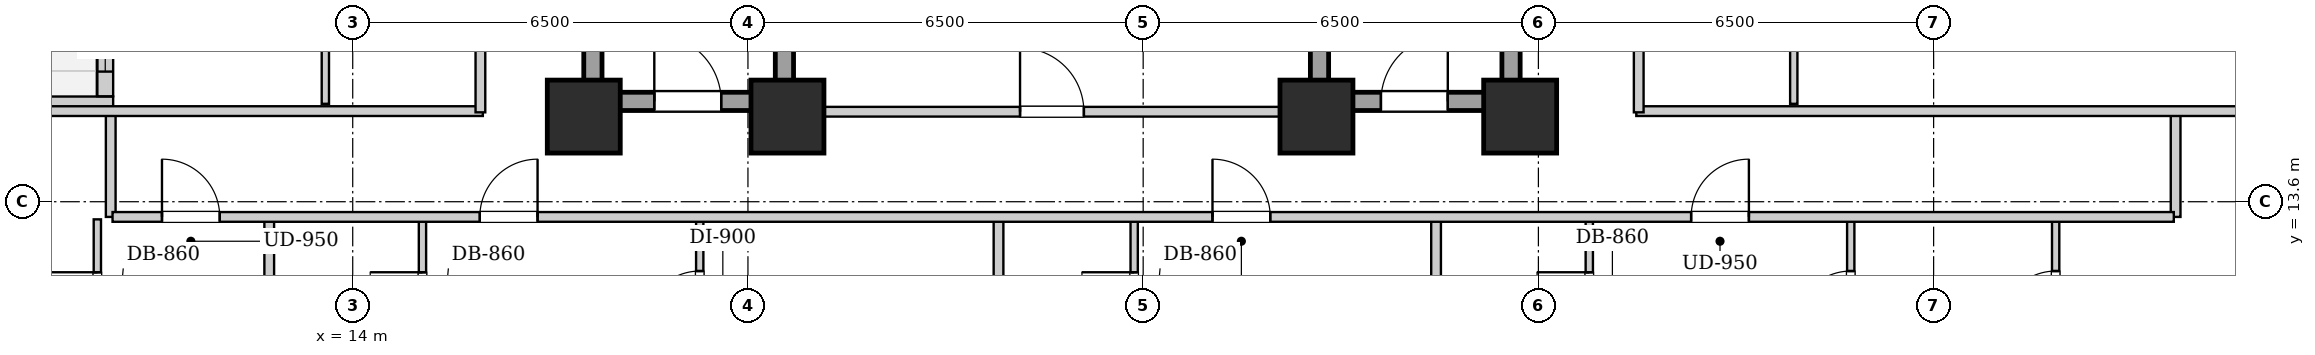
"""IFC4 building model, lengths in metres.
Left out: names, types, materials, properties, quantities, classifications, styles, units other than length and angle.
Written with IfcOpenShell. Run it as: python <this file> out.ifc"""

import sys

from ifc_helpers import new_model, si_unit, direction, frame, frame_2d, origin, origin_2d, place, context, subcontext, project, spatial, rectangle, extrude, element, fill, save


model = new_model("IFC4")
c1 = context("Model", 3, precision=1e-05, world=origin(), true_north=direction((0.0, 1.0)))
c2 = subcontext(c1, "Body", "Model", "MODEL_VIEW")
j1 = project(units=[si_unit("LENGTHUNIT", "METRE"), si_unit("PLANEANGLEUNIT", "RADIAN")], contexts=[c1])
p1 = place(None, origin())
s1 = spatial("IfcSite", under=j1, at=p1, CompositionType="ELEMENT")
p2 = place(p1, origin())
s2 = spatial("IfcBuilding", under=s1, at=p2, CompositionType="ELEMENT")
p3 = place(p2, frame((0.0, 0.0, 57.8)))
s3 = spatial("IfcBuildingStorey", under=s2, at=p3, CompositionType="ELEMENT", Elevation=57.8)
for number, where, z_axis, x_axis in (
    (1, (17.8, 15.0, 0.0), (0.0, 0.0, 1.0), (1.0, 0.0, 0.0)),
    (2, (21.15, 15.0, 0.0), (0.0, 0.0, 1.0), (1.0, 0.0, 0.0)),
    (3, (29.85, 15.0, 0.0), (0.0, 0.0, 1.0), (1.0, 0.0, 0.0)),
    (4, (33.2, 15.0, 0.0), (0.0, 0.0, 1.0), (1.0, 0.0, 0.0)),
):
    element("IfcColumn", number, at=place(p3, frame(where, z_axis=z_axis, x_axis=x_axis)), inside=s3, PredefinedType="COLUMN", context=c2, shape_type="SweptSolid", body=[
        extrude(rectangle(XDim=1.2, YDim=1.2, at=origin_2d()), origin(), (0.0, 0.0, 1.0), 3.2),
    ])
p4 = place(p3, frame((7.66, 15.2, 0.0), z_axis=(0.0, 0.0, 1.0), x_axis=(1.0, 0.0, 0.0)))
e5 = element("IfcWall", 5, at=p4, inside=s3, PredefinedType="SOLIDWALL", context=c2, shape_type="SweptSolid", body=[
    extrude(rectangle(XDim=2.4, YDim=0.26, at=frame_2d((1.2, 0.0))), origin(), (0.0, 0.0, 1.0), 2.94),
])
p5 = place(p3, frame((9.93, 15.334, 0.0), z_axis=(0.0, 0.0, 1.0), x_axis=(0.0, 1.0, 0.0)))
e6 = element("IfcWall", 6, at=p5, inside=s3, PredefinedType="SOLIDWALL", context=c2, shape_type="SweptSolid", body=[
    extrude(rectangle(XDim=3.932, YDim=0.26, at=frame_2d((1.966, 0.0))), origin(), (0.0, 0.0, 1.0), 2.94),
])
p6 = place(p5, frame((1.416, 0.0, 0.0)))
e7 = element("IfcOpeningElement", 7, at=p6, cuts=e6, PredefinedType="OPENING", context=c2, shape_type="SweptSolid", body=[
    extrude(rectangle(XDim=1.1, YDim=2.0, at=frame_2d((0.55, 1.0))), frame((0.0, 0.14, 0.0), z_axis=(0.0, -1.0, 0.0), x_axis=(1.0, 0.0, 0.0)), (0.0, 0.0, 1.0), 0.28),
])
p7 = place(p5, frame((0.406, 0.0, 0.55)))
e8 = element("IfcOpeningElement", 8, at=p7, cuts=e6, PredefinedType="OPENING", context=c2, shape_type="SweptSolid", body=[
    extrude(rectangle(XDim=0.85, YDim=1.2, at=frame_2d((0.425, 0.6))), frame((0.0, 0.14, 0.0), z_axis=(0.0, -1.0, 0.0), x_axis=(1.0, 0.0, 0.0)), (0.0, 0.0, 1.0), 0.28),
])
for number, where, z_axis, x_axis in (
    (9, (17.95, 15.1, 0.0), (0.0, 0.0, 1.0), (0.0, 1.0, 0.0)),
    (10, (21.1, 15.1, 0.0), (0.0, 0.0, 1.0), (0.0, 1.0, 0.0)),
):
    element("IfcWall", number, at=place(p3, frame(where, z_axis=z_axis, x_axis=x_axis)), inside=s3, PredefinedType="SHEAR", context=c2, shape_type="SweptSolid", body=[
        extrude(rectangle(XDim=9.0, YDim=0.3, at=frame_2d((4.5, 0.0))), origin(), (0.0, 0.0, 1.0), 2.94),
    ])
p8 = place(p3, frame((18.1, 15.25, 0.0), z_axis=(0.0, 0.0, 1.0), x_axis=(1.0, 0.0, 0.0)))
e11 = element("IfcWall", 11, at=p8, inside=s3, PredefinedType="SHEAR", context=c2, shape_type="SweptSolid", body=[
    extrude(rectangle(XDim=2.85, YDim=0.3, at=frame_2d((1.425, 0.0))), origin(), (0.0, 0.0, 1.0), 2.94),
])
p9 = place(p8, frame((0.86, 0.0, 0.0)))
e12 = element("IfcOpeningElement", 12, at=p9, cuts=e11, PredefinedType="OPENING", context=c2, shape_type="SweptSolid", body=[
    extrude(rectangle(XDim=1.1, YDim=2.05, at=frame_2d((0.55, 1.025))), frame((0.0, 0.16, 0.0), z_axis=(0.0, -1.0, 0.0), x_axis=(1.0, 0.0, 0.0)), (0.0, 0.0, 1.0), 0.32),
])
for number, where, z_axis, x_axis in (
    (13, (29.9, 15.1, 0.0), (0.0, 0.0, 1.0), (0.0, 1.0, 0.0)),
    (14, (33.05, 15.1, 0.0), (0.0, 0.0, 1.0), (0.0, 1.0, 0.0)),
):
    element("IfcWall", number, at=place(p3, frame(where, z_axis=z_axis, x_axis=x_axis)), inside=s3, PredefinedType="SHEAR", context=c2, shape_type="SweptSolid", body=[
        extrude(rectangle(XDim=9.0, YDim=0.3, at=frame_2d((4.5, 0.0))), origin(), (0.0, 0.0, 1.0), 2.94),
    ])
p10 = place(p3, frame((30.05, 15.25, 0.0), z_axis=(0.0, 0.0, 1.0), x_axis=(1.0, 0.0, 0.0)))
e15 = element("IfcWall", 15, at=p10, inside=s3, PredefinedType="SHEAR", context=c2, shape_type="SweptSolid", body=[
    extrude(rectangle(XDim=2.85, YDim=0.3, at=frame_2d((1.425, 0.0))), origin(), (0.0, 0.0, 1.0), 2.94),
])
p11 = place(p10, frame((0.86, 0.0, 0.0)))
e16 = element("IfcOpeningElement", 16, at=p11, cuts=e15, PredefinedType="OPENING", context=c2, shape_type="SweptSolid", body=[
    extrude(rectangle(XDim=1.1, YDim=2.05, at=frame_2d((0.55, 1.025))), frame((0.0, 0.16, 0.0), z_axis=(0.0, -1.0, 0.0), x_axis=(1.0, 0.0, 0.0)), (0.0, 0.0, 1.0), 0.32),
])
p12 = place(p3, frame((21.25, 15.08, 0.0), z_axis=(0.0, 0.0, 1.0), x_axis=(1.0, 0.0, 0.0)))
e17 = element("IfcWall", 17, at=p12, inside=s3, PredefinedType="PARTITIONING", context=c2, shape_type="SweptSolid", body=[
    extrude(rectangle(XDim=8.5, YDim=0.16, at=frame_2d((4.25, 0.0))), origin(), (0.0, 0.0, 1.0), 2.232),
])
p13 = place(p12, frame((3.725, 0.0, 0.0)))
e18 = element("IfcOpeningElement", 18, at=p13, cuts=e17, PredefinedType="OPENING", context=c2, shape_type="SweptSolid", body=[
    extrude(rectangle(XDim=1.05, YDim=2.05, at=frame_2d((0.525, 1.025))), frame((0.0, 0.09, 0.0), z_axis=(0.0, -1.0, 0.0), x_axis=(1.0, 0.0, 0.0)), (0.0, 0.0, 1.0), 0.18),
])
for number, where, z_axis, x_axis in (
    (19, (10.02, 13.35, 0.0), (0.0, 0.0, 1.0), (0.0, 1.0, 0.0)),
    (20, (43.98, 13.35, 0.0), (0.0, 0.0, 1.0), (0.0, 1.0, 0.0)),
):
    element("IfcWall", number, at=place(p3, frame(where, z_axis=z_axis, x_axis=x_axis)), inside=s3, PredefinedType="PARTITIONING", context=c2, shape_type="SweptSolid", body=[
        extrude(rectangle(XDim=1.74, YDim=0.16, at=frame_2d((0.87, 0.0))), origin(), (0.0, 0.0, 1.0), 2.94),
    ])
p14 = place(p3, frame((7.78, 15.09, 0.0), z_axis=(0.0, 0.0, 1.0), x_axis=(1.0, 0.0, 0.0)))
e21 = element("IfcWall", 21, at=p14, inside=s3, PredefinedType="PARTITIONING", context=c2, shape_type="SweptSolid", body=[
    extrude(rectangle(XDim=8.36, YDim=0.16, at=frame_2d((4.18, 0.0))), origin(), (0.0, 0.0, 1.0), 2.232),
])
p15 = place(p3, frame((35.11, 15.09, 0.0), z_axis=(0.0, 0.0, 1.0), x_axis=(1.0, 0.0, 0.0)))
e22 = element("IfcWall", 22, at=p15, inside=s3, PredefinedType="PARTITIONING", context=c2, shape_type="SweptSolid", body=[
    extrude(rectangle(XDim=11.11, YDim=0.16, at=frame_2d((5.555, 0.0))), origin(), (0.0, 0.0, 1.0), 2.232),
])
p16 = place(p3, frame((9.8, 10.71, 0.0), z_axis=(0.0, 0.0, 1.0), x_axis=(0.0, 1.0, 0.0)))
e23 = element("IfcWall", 23, at=p16, inside=s3, PredefinedType="PARTITIONING", context=c2, shape_type="SweptSolid", body=[
    extrude(rectangle(XDim=2.6, YDim=0.12, at=frame_2d((1.3, 0.0))), origin(), (0.0, 0.0, 1.0), 2.94),
])
p17 = place(p16, frame((0.87, 0.0, 0.0)))
e24 = element("IfcOpeningElement", 24, at=p17, cuts=e23, PredefinedType="OPENING", context=c2, shape_type="SweptSolid", body=[
    extrude(rectangle(XDim=0.86, YDim=2.05, at=frame_2d((0.43, 1.025))), frame((0.0, 0.07, 0.0), z_axis=(0.0, -1.0, 0.0), x_axis=(1.0, 0.0, 0.0)), (0.0, 0.0, 1.0), 0.14),
])
p18 = place(p3, frame((12.627, 2.26, 0.0), z_axis=(0.0, 0.0, 1.0), x_axis=(0.0, 1.0, 0.0)))
e25 = element("IfcWall", 25, at=p18, inside=s3, PredefinedType="PARTITIONING", context=c2, shape_type="SweptSolid", body=[
    extrude(rectangle(XDim=11.05, YDim=0.16, at=frame_2d((5.525, 0.0))), origin(), (0.0, 0.0, 1.0), 2.94),
])
p19 = place(p3, frame((15.147, 10.71, 0.0), z_axis=(0.0, 0.0, 1.0), x_axis=(0.0, 1.0, 0.0)))
e26 = element("IfcWall", 26, at=p19, inside=s3, PredefinedType="PARTITIONING", context=c2, shape_type="SweptSolid", body=[
    extrude(rectangle(XDim=2.6, YDim=0.12, at=frame_2d((1.3, 0.0))), origin(), (0.0, 0.0, 1.0), 2.94),
])
p20 = place(p19, frame((0.87, 0.0, 0.0)))
e27 = element("IfcOpeningElement", 27, at=p20, cuts=e26, PredefinedType="OPENING", context=c2, shape_type="SweptSolid", body=[
    extrude(rectangle(XDim=0.86, YDim=2.05, at=frame_2d((0.43, 1.025))), frame((0.0, 0.07, 0.0), z_axis=(0.0, -1.0, 0.0), x_axis=(1.0, 0.0, 0.0)), (0.0, 0.0, 1.0), 0.14),
])
p21 = place(p3, frame((19.707, 10.71, 0.0), z_axis=(0.0, 0.0, 1.0), x_axis=(0.0, 1.0, 0.0)))
e28 = element("IfcWall", 28, at=p21, inside=s3, PredefinedType="PARTITIONING", context=c2, shape_type="SweptSolid", body=[
    extrude(rectangle(XDim=2.6, YDim=0.12, at=frame_2d((1.3, 0.0))), origin(), (0.0, 0.0, 1.0), 2.94),
])
p22 = place(p21, frame((0.85, 0.0, 0.0)))
e29 = element("IfcOpeningElement", 29, at=p22, cuts=e28, PredefinedType="OPENING", context=c2, shape_type="SweptSolid", body=[
    extrude(rectangle(XDim=0.9, YDim=2.05, at=frame_2d((0.45, 1.025))), frame((0.0, 0.07, 0.0), z_axis=(0.0, -1.0, 0.0), x_axis=(1.0, 0.0, 0.0)), (0.0, 0.0, 1.0), 0.14),
])
p23 = place(p3, frame((24.621, 0.28, 0.0), z_axis=(0.0, 0.0, 1.0), x_axis=(0.0, 1.0, 0.0)))
e30 = element("IfcWall", 30, at=p23, inside=s3, PredefinedType="PARTITIONING", context=c2, shape_type="SweptSolid", body=[
    extrude(rectangle(XDim=13.03, YDim=0.16, at=frame_2d((6.515, 0.0))), origin(), (0.0, 0.0, 1.0), 2.94),
])
p24 = place(p3, frame((26.852, 10.71, 0.0), z_axis=(0.0, 0.0, 1.0), x_axis=(0.0, 1.0, 0.0)))
e31 = element("IfcWall", 31, at=p24, inside=s3, PredefinedType="PARTITIONING", context=c2, shape_type="SweptSolid", body=[
    extrude(rectangle(XDim=2.6, YDim=0.12, at=frame_2d((1.3, 0.0))), origin(), (0.0, 0.0, 1.0), 2.94),
])
p25 = place(p24, frame((0.87, 0.0, 0.0)))
e32 = element("IfcOpeningElement", 32, at=p25, cuts=e31, PredefinedType="OPENING", context=c2, shape_type="SweptSolid", body=[
    extrude(rectangle(XDim=0.86, YDim=2.05, at=frame_2d((0.43, 1.025))), frame((0.0, 0.07, 0.0), z_axis=(0.0, -1.0, 0.0), x_axis=(1.0, 0.0, 0.0)), (0.0, 0.0, 1.0), 0.14),
])
p26 = place(p3, frame((31.817, 0.28, 0.0), z_axis=(0.0, 0.0, 1.0), x_axis=(0.0, 1.0, 0.0)))
e33 = element("IfcWall", 33, at=p26, inside=s3, PredefinedType="PARTITIONING", context=c2, shape_type="SweptSolid", body=[
    extrude(rectangle(XDim=13.03, YDim=0.16, at=frame_2d((6.515, 0.0))), origin(), (0.0, 0.0, 1.0), 2.94),
])
p27 = place(p3, frame((34.337, 10.71, 0.0), z_axis=(0.0, 0.0, 1.0), x_axis=(0.0, 1.0, 0.0)))
e34 = element("IfcWall", 34, at=p27, inside=s3, PredefinedType="PARTITIONING", context=c2, shape_type="SweptSolid", body=[
    extrude(rectangle(XDim=2.6, YDim=0.12, at=frame_2d((1.3, 0.0))), origin(), (0.0, 0.0, 1.0), 2.94),
])
p28 = place(p27, frame((0.87, 0.0, 0.0)))
e35 = element("IfcOpeningElement", 35, at=p28, cuts=e34, PredefinedType="OPENING", context=c2, shape_type="SweptSolid", body=[
    extrude(rectangle(XDim=0.86, YDim=2.05, at=frame_2d((0.43, 1.025))), frame((0.0, 0.07, 0.0), z_axis=(0.0, -1.0, 0.0), x_axis=(1.0, 0.0, 0.0)), (0.0, 0.0, 1.0), 0.14),
])
p29 = place(p3, frame((38.637, 10.71, 0.0), z_axis=(0.0, 0.0, 1.0), x_axis=(0.0, 1.0, 0.0)))
e36 = element("IfcWall", 36, at=p29, inside=s3, PredefinedType="PARTITIONING", context=c2, shape_type="SweptSolid", body=[
    extrude(rectangle(XDim=2.6, YDim=0.12, at=frame_2d((1.3, 0.0))), origin(), (0.0, 0.0, 1.0), 2.94),
])
p30 = place(p29, frame((0.85, 0.0, 0.0)))
e37 = element("IfcOpeningElement", 37, at=p30, cuts=e36, PredefinedType="OPENING", context=c2, shape_type="SweptSolid", body=[
    extrude(rectangle(XDim=0.9, YDim=2.05, at=frame_2d((0.45, 1.025))), frame((0.0, 0.07, 0.0), z_axis=(0.0, -1.0, 0.0), x_axis=(1.0, 0.0, 0.0)), (0.0, 0.0, 1.0), 0.14),
])
p31 = place(p3, frame((42.007, 10.71, 0.0), z_axis=(0.0, 0.0, 1.0), x_axis=(0.0, 1.0, 0.0)))
e38 = element("IfcWall", 38, at=p31, inside=s3, PredefinedType="PARTITIONING", context=c2, shape_type="SweptSolid", body=[
    extrude(rectangle(XDim=2.6, YDim=0.12, at=frame_2d((1.3, 0.0))), origin(), (0.0, 0.0, 1.0), 2.94),
])
p32 = place(p31, frame((0.85, 0.0, 0.0)))
e39 = element("IfcOpeningElement", 39, at=p32, cuts=e38, PredefinedType="OPENING", context=c2, shape_type="SweptSolid", body=[
    extrude(rectangle(XDim=0.9, YDim=2.05, at=frame_2d((0.45, 1.025))), frame((0.0, 0.07, 0.0), z_axis=(0.0, -1.0, 0.0), x_axis=(1.0, 0.0, 0.0)), (0.0, 0.0, 1.0), 0.14),
])
for number, where, z_axis, x_axis in (
    (40, (13.55, 15.21, 0.0), (0.0, 0.0, 1.0), (0.0, 1.0, 0.0)),
    (41, (37.7, 15.21, 0.0), (0.0, 0.0, 1.0), (0.0, 1.0, 0.0)),
):
    element("IfcWall", number, at=place(p3, frame(where, z_axis=z_axis, x_axis=x_axis)), inside=s3, PredefinedType="PARTITIONING", context=c2, shape_type="SweptSolid", body=[
        extrude(rectangle(XDim=1.85, YDim=0.12, at=frame_2d((0.925, 0.0))), origin(), (0.0, 0.0, 1.0), 2.94),
    ])
p33 = place(p3, frame((10.05, 13.35, 0.0), z_axis=(0.0, 0.0, 1.0), x_axis=(1.0, 0.0, 0.0)))
e42 = element("IfcWall", 42, at=p33, inside=s3, PredefinedType="PARTITIONING", context=c2, shape_type="SweptSolid", body=[
    extrude(rectangle(XDim=33.9, YDim=0.16, at=frame_2d((16.95, 0.0))), origin(), (0.0, 0.0, 1.0), 2.94),
])
p34 = place(p33, frame((0.813, 0.0, 0.0)))
e43 = element("IfcOpeningElement", 43, at=p34, cuts=e42, PredefinedType="OPENING", context=c2, shape_type="SweptSolid", body=[
    extrude(rectangle(XDim=0.95, YDim=2.1, at=frame_2d((0.475, 1.05))), frame((0.0, 0.09, 0.0), z_axis=(0.0, -1.0, 0.0), x_axis=(1.0, 0.0, 0.0)), (0.0, 0.0, 1.0), 0.18),
])
p35 = place(p33, frame((6.04, 0.0, 0.0)))
e44 = element("IfcOpeningElement", 44, at=p35, cuts=e42, PredefinedType="OPENING", context=c2, shape_type="SweptSolid", body=[
    extrude(rectangle(XDim=0.95, YDim=2.1, at=frame_2d((0.475, 1.05))), frame((0.0, 0.09, 0.0), z_axis=(0.0, -1.0, 0.0), x_axis=(1.0, 0.0, 0.0)), (0.0, 0.0, 1.0), 0.18),
])
p36 = place(p33, frame((18.09, 0.0, 0.0)))
e45 = element("IfcOpeningElement", 45, at=p36, cuts=e42, PredefinedType="OPENING", context=c2, shape_type="SweptSolid", body=[
    extrude(rectangle(XDim=0.95, YDim=2.1, at=frame_2d((0.475, 1.05))), frame((0.0, 0.09, 0.0), z_axis=(0.0, -1.0, 0.0), x_axis=(1.0, 0.0, 0.0)), (0.0, 0.0, 1.0), 0.18),
])
p37 = place(p33, frame((25.962, 0.0, 0.0)))
e46 = element("IfcOpeningElement", 46, at=p37, cuts=e42, PredefinedType="OPENING", context=c2, shape_type="SweptSolid", body=[
    extrude(rectangle(XDim=0.95, YDim=2.1, at=frame_2d((0.475, 1.05))), frame((0.0, 0.09, 0.0), z_axis=(0.0, -1.0, 0.0), x_axis=(1.0, 0.0, 0.0)), (0.0, 0.0, 1.0), 0.18),
])
p38 = place(p3, frame((16.1, 15.07, 0.0), z_axis=(0.0, 0.0, 1.0), x_axis=(0.0, 1.0, 0.0)))
e47 = element("IfcWall", 47, at=p38, inside=s3, PredefinedType="PARTITIONING", context=c2, shape_type="SweptSolid", body=[
    extrude(rectangle(XDim=13.93, YDim=0.16, at=frame_2d((6.965, 0.0))), origin(), (0.0, 0.0, 1.0), 2.94),
])
p39 = place(p38, frame((3.608, 0.0, 0.0)))
e48 = element("IfcOpeningElement", 48, at=p39, cuts=e47, PredefinedType="OPENING", context=c2, shape_type="SweptSolid", body=[
    extrude(rectangle(XDim=0.95, YDim=2.1, at=frame_2d((0.475, 1.05))), frame((0.0, 0.09, 0.0), z_axis=(0.0, -1.0, 0.0), x_axis=(1.0, 0.0, 0.0)), (0.0, 0.0, 1.0), 0.18),
])
p40 = place(p38, frame((10.649, 0.0, 0.0)))
e49 = element("IfcOpeningElement", 49, at=p40, cuts=e47, PredefinedType="OPENING", context=c2, shape_type="SweptSolid", body=[
    extrude(rectangle(XDim=0.95, YDim=2.1, at=frame_2d((0.475, 1.05))), frame((0.0, 0.09, 0.0), z_axis=(0.0, -1.0, 0.0), x_axis=(1.0, 0.0, 0.0)), (0.0, 0.0, 1.0), 0.18),
])
p41 = place(p3, frame((35.15, 15.07, 0.0), z_axis=(0.0, 0.0, 1.0), x_axis=(0.0, 1.0, 0.0)))
e50 = element("IfcWall", 50, at=p41, inside=s3, PredefinedType="PARTITIONING", context=c2, shape_type="SweptSolid", body=[
    extrude(rectangle(XDim=13.93, YDim=0.16, at=frame_2d((6.965, 0.0))), origin(), (0.0, 0.0, 1.0), 2.94),
])
p42 = place(p41, frame((3.608, 0.0, 0.0)))
e51 = element("IfcOpeningElement", 51, at=p42, cuts=e50, PredefinedType="OPENING", context=c2, shape_type="SweptSolid", body=[
    extrude(rectangle(XDim=0.95, YDim=2.1, at=frame_2d((0.475, 1.05))), frame((0.0, 0.09, 0.0), z_axis=(0.0, -1.0, 0.0), x_axis=(1.0, 0.0, 0.0)), (0.0, 0.0, 1.0), 0.18),
])
p43 = place(p41, frame((10.649, 0.0, 0.0)))
e52 = element("IfcOpeningElement", 52, at=p43, cuts=e50, PredefinedType="OPENING", context=c2, shape_type="SweptSolid", body=[
    extrude(rectangle(XDim=0.95, YDim=2.1, at=frame_2d((0.475, 1.05))), frame((0.0, 0.09, 0.0), z_axis=(0.0, -1.0, 0.0), x_axis=(1.0, 0.0, 0.0)), (0.0, 0.0, 1.0), 0.18),
])
p44 = place(p9, origin())
e53 = element("IfcDoor", 53, at=p44, inside=s3, OperationType="SINGLE_SWING_LEFT", PredefinedType="DOOR", context=c2, shape_type="SweptSolid", body=[
    extrude(rectangle(XDim=1.1, YDim=2.05, at=frame_2d((0.55, 1.025))), frame((0.0, 0.025, 0.0), z_axis=(0.0, -1.0, 0.0), x_axis=(1.0, 0.0, 0.0)), (0.0, 0.0, 1.0), 0.05),
])
fill(e12, e53)
p45 = place(p11, origin())
e54 = element("IfcDoor", 54, at=p45, inside=s3, OperationType="SINGLE_SWING_RIGHT", PredefinedType="DOOR", context=c2, shape_type="SweptSolid", body=[
    extrude(rectangle(XDim=1.1, YDim=2.05, at=frame_2d((0.55, 1.025))), frame((0.0, 0.025, 0.0), z_axis=(0.0, -1.0, 0.0), x_axis=(1.0, 0.0, 0.0)), (0.0, 0.0, 1.0), 0.05),
])
fill(e16, e54)
p46 = place(p13, origin())
e55 = element("IfcDoor", 55, at=p46, inside=s3, OperationType="SINGLE_SWING_LEFT", PredefinedType="DOOR", context=c2, shape_type="SweptSolid", body=[
    extrude(rectangle(XDim=1.05, YDim=2.05, at=frame_2d((0.525, 1.025))), frame((0.0, 0.025, 0.0), z_axis=(0.0, -1.0, 0.0), x_axis=(1.0, 0.0, 0.0)), (0.0, 0.0, 1.0), 0.05),
])
fill(e18, e55)
p47 = place(p17, origin())
e56 = element("IfcDoor", 56, at=p47, inside=s3, OperationType="SINGLE_SWING_RIGHT", PredefinedType="DOOR", context=c2, shape_type="SweptSolid", body=[
    extrude(rectangle(XDim=0.86, YDim=2.05, at=frame_2d((0.43, 1.025))), frame((0.0, 0.025, 0.0), z_axis=(0.0, -1.0, 0.0), x_axis=(1.0, 0.0, 0.0)), (0.0, 0.0, 1.0), 0.05),
])
fill(e24, e56)
p48 = place(p20, origin())
e57 = element("IfcDoor", 57, at=p48, inside=s3, OperationType="SINGLE_SWING_RIGHT", PredefinedType="DOOR", context=c2, shape_type="SweptSolid", body=[
    extrude(rectangle(XDim=0.86, YDim=2.05, at=frame_2d((0.43, 1.025))), frame((0.0, 0.025, 0.0), z_axis=(0.0, -1.0, 0.0), x_axis=(1.0, 0.0, 0.0)), (0.0, 0.0, 1.0), 0.05),
])
fill(e27, e57)
p49 = place(p22, origin())
e58 = element("IfcDoor", 58, at=p49, inside=s3, OperationType="SINGLE_SWING_LEFT", PredefinedType="DOOR", context=c2, shape_type="SweptSolid", body=[
    extrude(rectangle(XDim=0.9, YDim=2.05, at=frame_2d((0.45, 1.025))), frame((0.0, 0.025, 0.0), z_axis=(0.0, -1.0, 0.0), x_axis=(1.0, 0.0, 0.0)), (0.0, 0.0, 1.0), 0.05),
])
fill(e29, e58)
p50 = place(p25, origin())
e59 = element("IfcDoor", 59, at=p50, inside=s3, OperationType="SINGLE_SWING_RIGHT", PredefinedType="DOOR", context=c2, shape_type="SweptSolid", body=[
    extrude(rectangle(XDim=0.86, YDim=2.05, at=frame_2d((0.43, 1.025))), frame((0.0, 0.025, 0.0), z_axis=(0.0, -1.0, 0.0), x_axis=(1.0, 0.0, 0.0)), (0.0, 0.0, 1.0), 0.05),
])
fill(e32, e59)
p51 = place(p28, origin())
e60 = element("IfcDoor", 60, at=p51, inside=s3, OperationType="SINGLE_SWING_RIGHT", PredefinedType="DOOR", context=c2, shape_type="SweptSolid", body=[
    extrude(rectangle(XDim=0.86, YDim=2.05, at=frame_2d((0.43, 1.025))), frame((0.0, 0.025, 0.0), z_axis=(0.0, -1.0, 0.0), x_axis=(1.0, 0.0, 0.0)), (0.0, 0.0, 1.0), 0.05),
])
fill(e35, e60)
p52 = place(p30, origin())
e61 = element("IfcDoor", 61, at=p52, inside=s3, OperationType="SINGLE_SWING_LEFT", PredefinedType="DOOR", context=c2, shape_type="SweptSolid", body=[
    extrude(rectangle(XDim=0.9, YDim=2.05, at=frame_2d((0.45, 1.025))), frame((0.0, 0.025, 0.0), z_axis=(0.0, -1.0, 0.0), x_axis=(1.0, 0.0, 0.0)), (0.0, 0.0, 1.0), 0.05),
])
fill(e37, e61)
p53 = place(p32, origin())
e62 = element("IfcDoor", 62, at=p53, inside=s3, OperationType="SINGLE_SWING_LEFT", PredefinedType="DOOR", context=c2, shape_type="SweptSolid", body=[
    extrude(rectangle(XDim=0.9, YDim=2.05, at=frame_2d((0.45, 1.025))), frame((0.0, 0.025, 0.0), z_axis=(0.0, -1.0, 0.0), x_axis=(1.0, 0.0, 0.0)), (0.0, 0.0, 1.0), 0.05),
])
fill(e39, e62)
p54 = place(p34, origin())
e63 = element("IfcDoor", 63, at=p54, inside=s3, OperationType="SINGLE_SWING_LEFT", PredefinedType="DOOR", context=c2, shape_type="SweptSolid", body=[
    extrude(rectangle(XDim=0.95, YDim=2.1, at=frame_2d((0.475, 1.05))), frame((0.0, 0.025, 0.0), z_axis=(0.0, -1.0, 0.0), x_axis=(1.0, 0.0, 0.0)), (0.0, 0.0, 1.0), 0.05),
])
fill(e43, e63)
p55 = place(p35, origin())
e64 = element("IfcDoor", 64, at=p55, inside=s3, OperationType="SINGLE_SWING_RIGHT", PredefinedType="DOOR", context=c2, shape_type="SweptSolid", body=[
    extrude(rectangle(XDim=0.95, YDim=2.1, at=frame_2d((0.475, 1.05))), frame((0.0, 0.025, 0.0), z_axis=(0.0, -1.0, 0.0), x_axis=(1.0, 0.0, 0.0)), (0.0, 0.0, 1.0), 0.05),
])
fill(e44, e64)
p56 = place(p36, origin())
e65 = element("IfcDoor", 65, at=p56, inside=s3, OperationType="SINGLE_SWING_LEFT", PredefinedType="DOOR", context=c2, shape_type="SweptSolid", body=[
    extrude(rectangle(XDim=0.95, YDim=2.1, at=frame_2d((0.475, 1.05))), frame((0.0, 0.025, 0.0), z_axis=(0.0, -1.0, 0.0), x_axis=(1.0, 0.0, 0.0)), (0.0, 0.0, 1.0), 0.05),
])
fill(e45, e65)
p57 = place(p37, origin())
e66 = element("IfcDoor", 66, at=p57, inside=s3, OperationType="SINGLE_SWING_RIGHT", PredefinedType="DOOR", context=c2, shape_type="SweptSolid", body=[
    extrude(rectangle(XDim=0.95, YDim=2.1, at=frame_2d((0.475, 1.05))), frame((0.0, 0.025, 0.0), z_axis=(0.0, -1.0, 0.0), x_axis=(1.0, 0.0, 0.0)), (0.0, 0.0, 1.0), 0.05),
])
fill(e46, e66)
p58 = place(p7, origin())
e67 = element("IfcWindow", 67, at=p58, inside=s3, PartitioningType="SINGLE_PANEL", PredefinedType="WINDOW", context=c2, shape_type="SweptSolid", body=[
    extrude(rectangle(XDim=0.85, YDim=1.2, at=frame_2d((0.425, 0.6))), frame((0.0, 0.03, 0.0), z_axis=(0.0, -1.0, 0.0), x_axis=(1.0, 0.0, 0.0)), (0.0, 0.0, 1.0), 0.06),
])
fill(e8, e67)
save(model, sys.argv[1])
